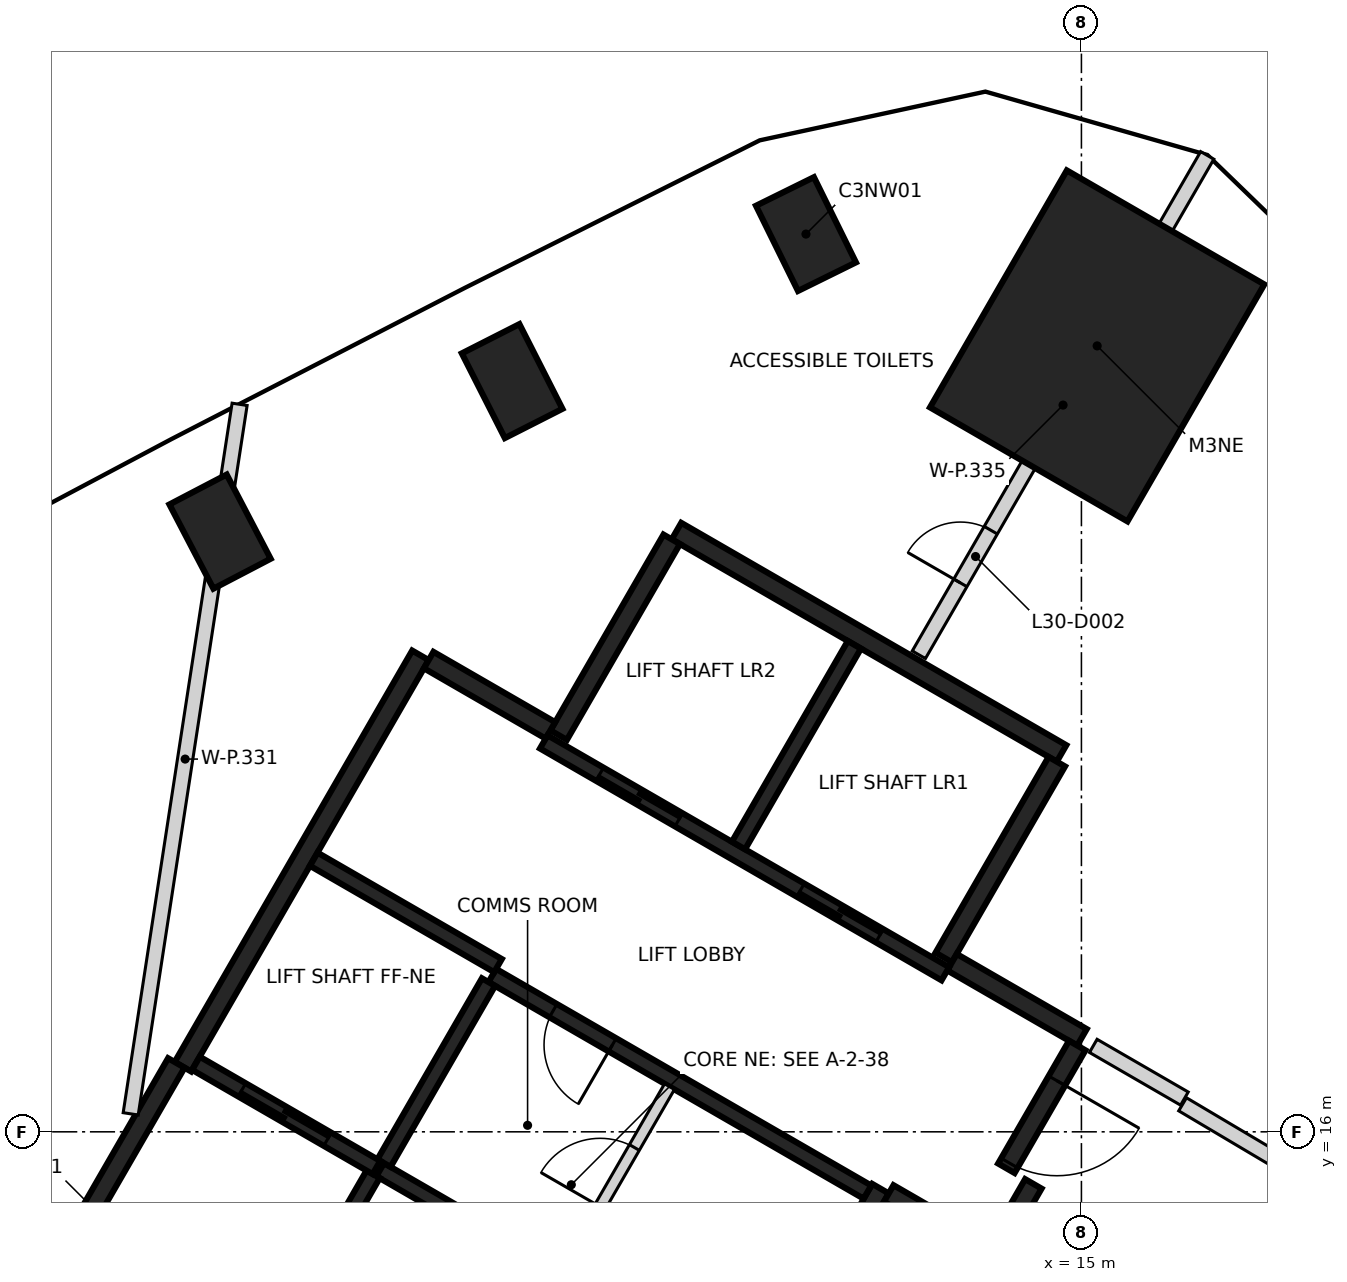
"""IFC4 building model, lengths in metres.
Left out: names, types, materials, properties, quantities, classifications, styles, units other than length and angle.
Written with IfcOpenShell. Run it as: python <this file> out.ifc"""

import sys

from ifc_helpers import new_model, si_unit, direction, frame, frame_2d, origin, origin_2d, place, context, subcontext, project, spatial, rectangle, extrude, element, fill, save


model = new_model("IFC4")
c1 = context("Model", 3, precision=1e-05, world=origin(), true_north=direction((0.0, 1.0)))
c2 = subcontext(c1, "Body", "Model", "MODEL_VIEW")
j1 = project(units=[si_unit("LENGTHUNIT", "METRE"), si_unit("PLANEANGLEUNIT", "RADIAN")], contexts=[c1])
p1 = place(None, origin())
s1 = spatial("IfcSite", under=j1, at=p1, CompositionType="ELEMENT")
p2 = place(p1, origin())
s2 = spatial("IfcBuilding", under=s1, at=p2, CompositionType="ELEMENT")
p3 = place(p2, frame((0.0, 0.0, 123.8)))
s3 = spatial("IfcBuildingStorey", under=s2, at=p3, CompositionType="ELEMENT", Elevation=123.8)
for number, where, z_axis, x_axis in (
    (1, (11.376, 27.811, -0.4), (0.0, 0.0, 1.0), (-0.442, 0.897, 0.0)),
    (2, (7.51, 25.876, -0.4), (0.0, 0.0, 1.0), (-0.453, 0.892, 0.0)),
    (3, (3.667, 23.896, -0.4), (0.0, 0.0, 1.0), (-0.463, 0.886, 0.0)),
):
    element("IfcColumn", number, at=place(p3, frame(where, z_axis=z_axis, x_axis=x_axis)), inside=s3, PredefinedType="COLUMN", context=c2, shape_type="SweptSolid", body=[
        extrude(rectangle(XDim=1.25, YDim=0.85, at=origin_2d()), origin(), (0.0, 0.0, 1.0), 5.0),
    ])
p4 = place(p3, frame((15.207, 26.34, -0.4), z_axis=(0.0, 0.0, 1.0), x_axis=(0.5, 0.866025403784, 0.0)))
e4 = element("IfcColumn", 4, at=p4, inside=s3, PredefinedType="COLUMN", context=c2, shape_type="SweptSolid", body=[
    extrude(rectangle(XDim=3.6, YDim=3.0, at=origin_2d()), origin(), (0.0, 0.0, 1.0), 5.0),
])
p5 = place(p3, frame((3.179, 16.856, 0.0), z_axis=(0.0, 0.0, 1.0), x_axis=(0.500004234368, 0.866022959057, 0.0)))
e5 = element("IfcWall", 5, at=p5, inside=s3, PredefinedType="SHEAR", context=c2, shape_type="SweptSolid", body=[
    extrude(rectangle(XDim=6.25, YDim=0.25, at=frame_2d((3.125, 0.0))), origin(), (0.0, 0.0, 1.0), 4.6),
])
p6 = place(p3, frame((9.673, 23.903, 0.0), z_axis=(0.0, 0.0, 1.0), x_axis=(0.86603616409, -0.499981362141, 0.0)))
e6 = element("IfcWall", 6, at=p6, inside=s3, PredefinedType="SHEAR", context=c2, shape_type="SweptSolid", body=[
    extrude(rectangle(XDim=5.85, YDim=0.25, at=frame_2d((2.925, 0.0))), origin(), (0.0, 0.0, 1.0), 4.6),
])
p7 = place(p3, frame((0.48, 12.381, 0.0), z_axis=(0.0, 0.0, 1.0), x_axis=(0.49999885962, 0.866026062182, 0.0)))
e7 = element("IfcWall", 7, at=p7, inside=s3, PredefinedType="SHEAR", context=c2, shape_type="SweptSolid", body=[
    extrude(rectangle(XDim=5.225, YDim=0.25, at=frame_2d((2.612, 0.0))), origin(), (0.0, 0.0, 1.0), 4.6),
])
p8 = place(p3, frame((12.357, 15.252, 0.0), z_axis=(0.0, 0.0, 1.0), x_axis=(-0.500028443584, -0.866008981251, 0.0)))
e8 = element("IfcWall", 8, at=p8, inside=s3, PredefinedType="SHEAR", context=c2, shape_type="SweptSolid", body=[
    extrude(rectangle(XDim=3.2, YDim=0.25, at=frame_2d((1.6, 0.0))), origin(), (0.0, 0.0, 1.0), 4.6),
])
for number, where, z_axis, x_axis in (
    (9, (8.123, 21.219, 0.0), (0.0, 0.0, 1.0), (0.5, 0.866, 0.0)),
    (10, (14.676, 20.87, 0.0), (0.0, 0.0, 1.0), (-0.5, -0.866, 0.0)),
):
    element("IfcWall", number, at=place(p3, frame(where, z_axis=z_axis, x_axis=x_axis)), inside=s3, PredefinedType="SHEAR", context=c2, shape_type="SweptSolid", body=[
        extrude(rectangle(XDim=2.975, YDim=0.25, at=frame_2d((1.487, 0.0))), origin(), (0.0, 0.0, 1.0), 4.6),
    ])
p9 = place(p3, frame((13.297, 18.231, 0.0), z_axis=(0.0, 0.0, 1.0), x_axis=(0.866043531843, -0.499968599967, 0.0)))
e11 = element("IfcWall", 11, at=p9, inside=s3, PredefinedType="SHEAR", context=c2, shape_type="SweptSolid", body=[
    extrude(rectangle(XDim=1.975, YDim=0.25, at=frame_2d((0.987, 0.0))), origin(), (0.0, 0.0, 1.0), 4.6),
])
p10 = place(p3, frame((6.413, 22.206, 0.0), z_axis=(0.0, 0.0, 1.0), x_axis=(0.866016279763, -0.500015802937, 0.0)))
e12 = element("IfcWall", 12, at=p10, inside=s3, PredefinedType="SHEAR", context=c2, shape_type="SweptSolid", body=[
    extrude(rectangle(XDim=1.849, YDim=0.25, at=frame_2d((0.925, 0.0))), origin(), (0.0, 0.0, 1.0), 4.6),
])
p11 = place(p3, frame((14.945, 17.135, 0.0), z_axis=(0.0, 0.0, 1.0), x_axis=(-0.499983108224, -0.866035156036, 0.0)))
e13 = element("IfcWall", 13, at=p11, inside=s3, PredefinedType="SHEAR", context=c2, shape_type="SweptSolid", body=[
    extrude(rectangle(XDim=1.865, YDim=0.25, at=frame_2d((0.932, 0.0))), origin(), (0.0, 0.0, 1.0), 4.6),
])
p12 = place(p11, frame((0.535, 0.0, 0.0)))
e14 = element("IfcOpeningElement", 14, at=p12, cuts=e13, PredefinedType="OPENING", context=c2, shape_type="SweptSolid", body=[
    extrude(rectangle(XDim=1.25, YDim=2.1, at=frame_2d((0.625, 1.05))), frame((0.0, 0.135, 0.0), z_axis=(0.0, -1.0, 0.0), x_axis=(1.0, 0.0, 0.0)), (0.0, 0.0, 1.0), 0.27),
])
p13 = place(p3, frame((13.322, 14.695, 0.0), z_axis=(0.0, 0.0, 1.0), x_axis=(-0.866017078145, 0.500014420154, 0.0)))
e15 = element("IfcWall", 15, at=p13, inside=s3, PredefinedType="SHEAR", context=c2, shape_type="SweptSolid", body=[
    extrude(rectangle(XDim=0.989, YDim=0.25, at=frame_2d((0.495, 0.0))), origin(), (0.0, 0.0, 1.0), 4.6),
])
p14 = place(p3, frame((14.368, 15.315, 0.0), z_axis=(0.0, 0.0, 1.0), x_axis=(-0.499897359611, -0.866084655132, 0.0)))
e16 = element("IfcWall", 16, at=p14, inside=s3, PredefinedType="SHEAR", context=c2, shape_type="SweptSolid", body=[
    extrude(rectangle(XDim=0.685, YDim=0.25, at=frame_2d((0.342, 0.0))), origin(), (0.0, 0.0, 1.0), 4.6),
])
p15 = place(p3, frame((13.21, 18.08, 0.0), z_axis=(0.0, 0.0, 1.0), x_axis=(-0.866030299012, 0.499991521122, 0.0)))
e17 = element("IfcWall", 17, at=p15, inside=s3, PredefinedType="SHEAR", context=c2, shape_type="SweptSolid", body=[
    extrude(rectangle(XDim=6.1, YDim=0.2, at=frame_2d((3.05, 0.0))), origin(), (0.0, 0.0, 1.0), 4.6),
])
p16 = place(p15, frame((1.0, 0.0, 0.0)))
e18 = element("IfcOpeningElement", 18, at=p16, cuts=e17, PredefinedType="OPENING", context=c2, shape_type="SweptSolid", body=[
    extrude(rectangle(XDim=1.2, YDim=2.1, at=frame_2d((0.6, 1.05))), frame((0.0, 0.11, 0.0), z_axis=(0.0, -1.0, 0.0), x_axis=(1.0, 0.0, 0.0)), (0.0, 0.0, 1.0), 0.22),
])
p17 = place(p15, frame((4.05, 0.0, 0.0)))
e19 = element("IfcOpeningElement", 19, at=p17, cuts=e17, PredefinedType="OPENING", context=c2, shape_type="SweptSolid", body=[
    extrude(rectangle(XDim=1.2, YDim=2.1, at=frame_2d((0.6, 1.05))), frame((0.0, 0.11, 0.0), z_axis=(0.0, -1.0, 0.0), x_axis=(1.0, 0.0, 0.0)), (0.0, 0.0, 1.0), 0.22),
])
p18 = place(p3, frame((5.775, 15.502, 0.0), z_axis=(0.0, 0.0, 1.0), x_axis=(0.866020080793, -0.500009219579, 0.0)))
e20 = element("IfcWall", 20, at=p18, inside=s3, PredefinedType="SHEAR", context=c2, shape_type="SweptSolid", body=[
    extrude(rectangle(XDim=5.699, YDim=0.2, at=frame_2d((2.85, 0.0))), origin(), (0.0, 0.0, 1.0), 4.6),
])
p19 = place(p3, frame((12.185, 15.207, 0.0), z_axis=(0.0, 0.0, 1.0), x_axis=(-0.866020080793, 0.500009219579, 0.0)))
e21 = element("IfcWall", 21, at=p19, inside=s3, PredefinedType="SHEAR", context=c2, shape_type="SweptSolid", body=[
    extrude(rectangle(XDim=5.699, YDim=0.2, at=frame_2d((2.85, 0.0))), origin(), (0.0, 0.0, 1.0), 4.6),
])
p20 = place(p19, frame((3.874, 0.0, 0.0)))
e22 = element("IfcOpeningElement", 22, at=p20, cuts=e21, PredefinedType="OPENING", context=c2, shape_type="SweptSolid", body=[
    extrude(rectangle(XDim=0.9, YDim=2.1, at=frame_2d((0.45, 1.05))), frame((0.0, 0.11, 0.0), z_axis=(0.0, -1.0, 0.0), x_axis=(1.0, 0.0, 0.0)), (0.0, 0.0, 1.0), 0.22),
])
p21 = place(p3, frame((3.057, 10.895, 0.0), z_axis=(0.0, 0.0, 1.0), x_axis=(0.499989418164, 0.866031513124, 0.0)))
e23 = element("IfcWall", 23, at=p21, inside=s3, PredefinedType="SHEAR", context=c2, shape_type="SweptSolid", body=[
    extrude(rectangle(XDim=5.251, YDim=0.2, at=frame_2d((2.625, 0.0))), origin(), (0.0, 0.0, 1.0), 4.6),
])
p22 = place(p21, frame((1.849, 0.0, 0.0)))
e24 = element("IfcOpeningElement", 24, at=p22, cuts=e23, PredefinedType="OPENING", context=c2, shape_type="SweptSolid", body=[
    extrude(rectangle(XDim=1.4, YDim=2.1, at=frame_2d((0.7, 1.05))), frame((0.0, 0.11, 0.0), z_axis=(0.0, -1.0, 0.0), x_axis=(1.0, 0.0, 0.0)), (0.0, 0.0, 1.0), 0.22),
])
p23 = place(p3, frame((10.489, 19.767, 0.0), z_axis=(0.0, 0.0, 1.0), x_axis=(0.499946628782, 0.866056215479, 0.0)))
e25 = element("IfcWall", 25, at=p23, inside=s3, PredefinedType="SHEAR", context=c2, shape_type="SweptSolid", body=[
    extrude(rectangle(XDim=3.048, YDim=0.2, at=frame_2d((1.524, 0.0))), origin(), (0.0, 0.0, 1.0), 4.6),
])
p24 = place(p3, frame((7.199, 17.97, 0.0), z_axis=(0.0, 0.0, 1.0), x_axis=(-0.499968400327, -0.866043647095, 0.0)))
e26 = element("IfcWall", 26, at=p24, inside=s3, PredefinedType="SHEAR", context=c2, shape_type="SweptSolid", body=[
    extrude(rectangle(XDim=2.75, YDim=0.2, at=frame_2d((1.375, 0.0))), origin(), (0.0, 0.0, 1.0), 4.6),
])
p25 = place(p3, frame((5.725, 15.531, 0.0), z_axis=(0.0, 0.0, 1.0), x_axis=(-0.866037306777, 0.499979382845, 0.0)))
e27 = element("IfcWall", 27, at=p25, inside=s3, PredefinedType="SHEAR", context=c2, shape_type="SweptSolid", body=[
    extrude(rectangle(XDim=2.742, YDim=0.2, at=frame_2d((1.371, 0.0))), origin(), (0.0, 0.0, 1.0), 4.6),
])
p26 = place(p25, frame((0.743, 0.0, 0.0)))
e28 = element("IfcOpeningElement", 28, at=p26, cuts=e27, PredefinedType="OPENING", context=c2, shape_type="SweptSolid", body=[
    extrude(rectangle(XDim=1.3, YDim=2.1, at=frame_2d((0.65, 1.05))), frame((0.0, 0.11, 0.0), z_axis=(0.0, -1.0, 0.0), x_axis=(1.0, 0.0, 0.0)), (0.0, 0.0, 1.0), 0.22),
])
p27 = place(p3, frame((4.901, 19.586, 0.0), z_axis=(0.0, 0.0, 1.0), x_axis=(0.866022890907, -0.500004352405, 0.0)))
e29 = element("IfcWall", 29, at=p27, inside=s3, PredefinedType="SHEAR", context=c2, shape_type="SweptSolid", body=[
    extrude(rectangle(XDim=2.799, YDim=0.2, at=frame_2d((1.399, 0.0))), origin(), (0.0, 0.0, 1.0), 4.6),
])
p28 = place(p3, frame((8.207, 14.214, 0.0), z_axis=(0.0, 0.0, 1.0), x_axis=(0.499922376475, 0.866070215109, 0.0)))
e30 = element("IfcWall", 30, at=p28, inside=s3, PredefinedType="PARTITIONING", context=c2, shape_type="SweptSolid", body=[
    extrude(rectangle(XDim=2.749, YDim=0.15, at=frame_2d((1.374, 0.0))), origin(), (0.0, 0.0, 1.0), 4.6),
])
p29 = place(p28, frame((0.924, 0.0, 0.0)))
e31 = element("IfcOpeningElement", 31, at=p29, cuts=e30, PredefinedType="OPENING", context=c2, shape_type="SweptSolid", body=[
    extrude(rectangle(XDim=0.9, YDim=2.1, at=frame_2d((0.45, 1.05))), frame((0.0, 0.085, 0.0), z_axis=(0.0, -1.0, 0.0), x_axis=(1.0, 0.0, 0.0)), (0.0, 0.0, 1.0), 0.17),
])
p30 = place(p3, frame((15.156, 17.131, 0.0), z_axis=(0.0, 0.0, 1.0), x_axis=(0.865639364436, -0.500668044455, 0.0)))
e32 = element("IfcWall", 32, at=p30, inside=s3, PredefinedType="PARTITIONING", context=c2, shape_type="SweptSolid", body=[
    extrude(rectangle(XDim=1.385, YDim=0.2, at=frame_2d((0.693, 0.0))), origin(), (0.0, 0.0, 1.0), 4.6),
])
p31 = place(p3, frame((16.331, 16.362, 0.0), z_axis=(0.0, 0.0, 1.0), x_axis=(0.859936072859, -0.510401754107, 0.0)))
e33 = element("IfcWall", 33, at=p31, inside=s3, PredefinedType="PARTITIONING", context=c2, shape_type="SweptSolid", body=[
    extrude(rectangle(XDim=2.512, YDim=0.2, at=frame_2d((1.256, 0.0))), origin(), (0.0, 0.0, 1.0), 4.6),
])
p32 = place(p3, frame((2.492, 16.236, 0.0), z_axis=(0.0, 0.0, 1.0), x_axis=(0.151721108942, 0.988423343058, 0.0)))
e34 = element("IfcWall", 34, at=p32, inside=s3, PredefinedType="PARTITIONING", context=c2, shape_type="SweptSolid", body=[
    extrude(rectangle(XDim=9.444, YDim=0.2, at=frame_2d((4.722, 0.0))), origin(), (0.0, 0.0, 1.0), 4.6),
])
p33 = place(p3, frame((12.861, 22.276, 0.0), z_axis=(0.0, 0.0, 1.0), x_axis=(0.500132837022, 0.865948696709, 0.0)))
e35 = element("IfcWall", 35, at=p33, inside=s3, PredefinedType="PARTITIONING", context=c2, shape_type="SweptSolid", body=[
    extrude(rectangle(XDim=7.587, YDim=0.2, at=frame_2d((3.793, 0.0))), origin(), (0.0, 0.0, 1.0), 4.6),
])
p34 = place(p33, frame((1.092, 0.0, 0.0)))
e36 = element("IfcOpeningElement", 36, at=p34, cuts=e35, PredefinedType="OPENING", context=c2, shape_type="SweptSolid", body=[
    extrude(rectangle(XDim=0.8, YDim=2.1, at=frame_2d((0.4, 1.05))), frame((0.0, 0.11, 0.0), z_axis=(0.0, -1.0, 0.0), x_axis=(1.0, 0.0, 0.0)), (0.0, 0.0, 1.0), 0.22),
])
p35 = place(p26, origin())
e37 = element("IfcDoor", 37, at=p35, inside=s3, OperationType="SLIDING_TO_RIGHT", PredefinedType="DOOR", context=c2, shape_type="SweptSolid", body=[
    extrude(rectangle(XDim=1.3, YDim=2.1, at=frame_2d((0.65, 1.05))), frame((0.0, 0.025, 0.0), z_axis=(0.0, -1.0, 0.0), x_axis=(1.0, 0.0, 0.0)), (0.0, 0.0, 1.0), 0.05),
])
fill(e28, e37)
p36 = place(p16, origin())
e38 = element("IfcDoor", 38, at=p36, inside=s3, OperationType="DOUBLE_DOOR_SLIDING", PredefinedType="DOOR", context=c2, shape_type="SweptSolid", body=[
    extrude(rectangle(XDim=1.2, YDim=2.1, at=frame_2d((0.6, 1.05))), frame((0.0, 0.025, 0.0), z_axis=(0.0, -1.0, 0.0), x_axis=(1.0, 0.0, 0.0)), (0.0, 0.0, 1.0), 0.05),
])
fill(e18, e38)
p37 = place(p17, origin())
e39 = element("IfcDoor", 39, at=p37, inside=s3, OperationType="DOUBLE_DOOR_SLIDING", PredefinedType="DOOR", context=c2, shape_type="SweptSolid", body=[
    extrude(rectangle(XDim=1.2, YDim=2.1, at=frame_2d((0.6, 1.05))), frame((0.0, 0.025, 0.0), z_axis=(0.0, -1.0, 0.0), x_axis=(1.0, 0.0, 0.0)), (0.0, 0.0, 1.0), 0.05),
])
fill(e19, e39)
p38 = place(p12, origin())
e40 = element("IfcDoor", 40, at=p38, inside=s3, OperationType="SINGLE_SWING_LEFT", PredefinedType="DOOR", context=c2, shape_type="SweptSolid", body=[
    extrude(rectangle(XDim=1.25, YDim=2.1, at=frame_2d((0.625, 1.05))), frame((0.0, 0.025, 0.0), z_axis=(0.0, -1.0, 0.0), x_axis=(1.0, 0.0, 0.0)), (0.0, 0.0, 1.0), 0.05),
])
fill(e14, e40)
p39 = place(p20, origin())
e41 = element("IfcDoor", 41, at=p39, inside=s3, OperationType="SINGLE_SWING_LEFT", PredefinedType="DOOR", context=c2, shape_type="SweptSolid", body=[
    extrude(rectangle(XDim=0.9, YDim=2.1, at=frame_2d((0.45, 1.05))), frame((0.0, 0.025, 0.0), z_axis=(0.0, -1.0, 0.0), x_axis=(1.0, 0.0, 0.0)), (0.0, 0.0, 1.0), 0.05),
])
fill(e22, e41)
p40 = place(p29, origin())
e42 = element("IfcDoor", 42, at=p40, inside=s3, OperationType="SINGLE_SWING_LEFT", PredefinedType="DOOR", context=c2, shape_type="SweptSolid", body=[
    extrude(rectangle(XDim=0.9, YDim=2.1, at=frame_2d((0.45, 1.05))), frame((0.0, 0.025, 0.0), z_axis=(0.0, -1.0, 0.0), x_axis=(1.0, 0.0, 0.0)), (0.0, 0.0, 1.0), 0.05),
])
fill(e31, e42)
p41 = place(p34, origin())
e43 = element("IfcDoor", 43, at=p41, inside=s3, OperationType="SINGLE_SWING_LEFT", PredefinedType="DOOR", context=c2, shape_type="SweptSolid", body=[
    extrude(rectangle(XDim=0.8, YDim=2.1, at=frame_2d((0.4, 1.05))), frame((0.0, 0.025, 0.0), z_axis=(0.0, -1.0, 0.0), x_axis=(1.0, 0.0, 0.0)), (0.0, 0.0, 1.0), 0.05),
])
fill(e36, e43)
save(model, sys.argv[1])
